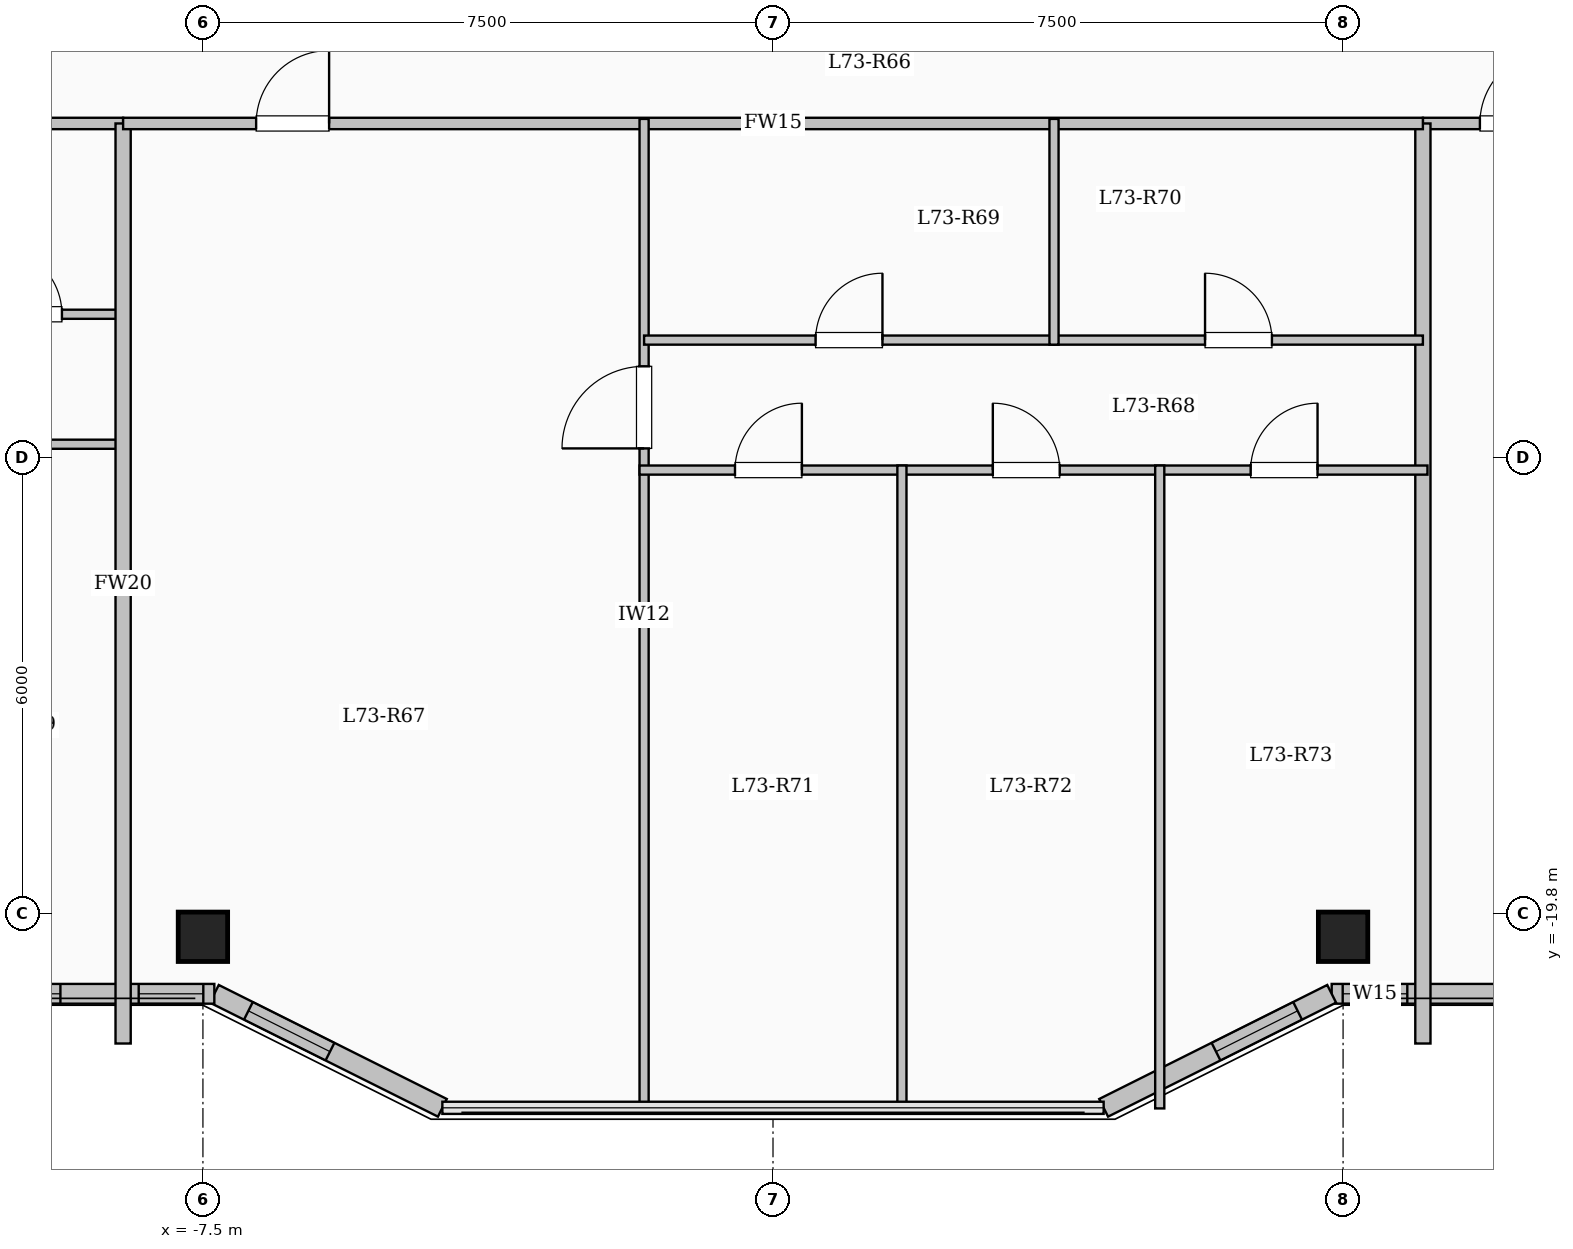
"""IFC4 building model, lengths in metres.
Left out: names, types, materials, properties, quantities, classifications, styles, units other than length and angle.
Written with IfcOpenShell. Run it as: python <this file> out.ifc"""

import sys

from ifc_helpers import new_model, si_unit, direction, frame, frame_2d, origin, origin_2d, place, context, subcontext, project, spatial, rectangle, extrude, element, fill, save


model = new_model("IFC4")
c1 = context("Model", 3, precision=1e-05, world=origin(), true_north=direction((0.0, 1.0)))
c2 = subcontext(c1, "Body", "Model", "MODEL_VIEW")
j1 = project(units=[si_unit("LENGTHUNIT", "METRE"), si_unit("PLANEANGLEUNIT", "RADIAN")], contexts=[c1])
p1 = place(None, origin())
s1 = spatial("IfcSite", under=j1, at=p1, CompositionType="ELEMENT")
p2 = place(p1, origin())
s2 = spatial("IfcBuilding", under=s1, at=p2, CompositionType="ELEMENT")
p3 = place(p2, frame((0.0, 0.0, 268.3)))
s3 = spatial("IfcBuildingStorey", under=s2, at=p3, CompositionType="ELEMENT", Elevation=268.3)
for number, where, z_axis, x_axis in (
    (1, (-7.5, -20.1, 0.0), (0.0, 0.0, 1.0), (1.0, 0.0, 0.0)),
    (2, (7.5, -20.1, 0.0), (0.0, 0.0, 1.0), (1.0, 0.0, 0.0)),
):
    element("IfcColumn", number, at=place(p3, frame(where, z_axis=z_axis, x_axis=x_axis)), inside=s3, PredefinedType="COLUMN", context=c2, shape_type="SweptSolid", body=[
        extrude(rectangle(XDim=0.65, YDim=0.65, at=origin_2d()), origin(), (0.0, 0.0, 1.0), 3.35),
    ])
p4 = place(p3, frame((17.85, -20.85, 0.0), z_axis=(0.0, 0.0, 1.0), x_axis=(-1.0, 0.0, 0.0)))
e3 = element("IfcWall", 3, at=p4, inside=s3, PredefinedType="SOLIDWALL", context=c2, shape_type="SweptSolid", body=[
    extrude(rectangle(XDim=10.5, YDim=0.26, at=frame_2d((5.25, 0.0))), origin(), (0.0, 0.0, 1.0), 3.05),
])
p5 = place(p4, frame((0.875, 0.0, 0.95)))
e4 = element("IfcOpeningElement", 4, at=p5, cuts=e3, PredefinedType="OPENING", context=c2, shape_type="SweptSolid", body=[
    extrude(rectangle(XDim=1.2, YDim=1.5, at=frame_2d((0.6, 0.75))), frame((0.0, 0.14, 0.0), z_axis=(0.0, -1.0, 0.0), x_axis=(1.0, 0.0, 0.0)), (0.0, 0.0, 1.0), 0.28),
])
p6 = place(p4, frame((3.625, 0.0, 0.95)))
e5 = element("IfcOpeningElement", 5, at=p6, cuts=e3, PredefinedType="OPENING", context=c2, shape_type="SweptSolid", body=[
    extrude(rectangle(XDim=1.2, YDim=1.5, at=frame_2d((0.6, 0.75))), frame((0.0, 0.14, 0.0), z_axis=(0.0, -1.0, 0.0), x_axis=(1.0, 0.0, 0.0)), (0.0, 0.0, 1.0), 0.28),
])
p7 = place(p4, frame((6.6, 0.0, 0.9)))
e6 = element("IfcOpeningElement", 6, at=p7, cuts=e3, PredefinedType="OPENING", context=c2, shape_type="SweptSolid", body=[
    extrude(rectangle(XDim=1.65, YDim=1.6, at=frame_2d((0.825, 0.8))), frame((0.0, 0.14, 0.0), z_axis=(0.0, -1.0, 0.0), x_axis=(1.0, 0.0, 0.0)), (0.0, 0.0, 1.0), 0.28),
])
p8 = place(p4, frame((9.505, 0.0, 0.95)))
e7 = element("IfcOpeningElement", 7, at=p8, cuts=e3, PredefinedType="OPENING", context=c2, shape_type="SweptSolid", body=[
    extrude(rectangle(XDim=0.85, YDim=1.5, at=frame_2d((0.425, 0.75))), frame((0.0, 0.14, 0.0), z_axis=(0.0, -1.0, 0.0), x_axis=(1.0, 0.0, 0.0)), (0.0, 0.0, 1.0), 0.28),
])
p9 = place(p3, frame((7.35, -20.85, 0.0), z_axis=(0.0, 0.0, 1.0), x_axis=(-0.894427191, -0.4472135955, 0.0)))
e8 = element("IfcWall", 8, at=p9, inside=s3, PredefinedType="SOLIDWALL", context=c2, shape_type="SweptSolid", body=[
    extrude(rectangle(XDim=3.354, YDim=0.26, at=frame_2d((1.677, 0.0))), origin(), (0.0, 0.0, 1.0), 3.05),
])
p10 = place(p9, frame((0.501, 0.0, 0.95)))
e9 = element("IfcOpeningElement", 9, at=p10, cuts=e8, PredefinedType="OPENING", context=c2, shape_type="SweptSolid", body=[
    extrude(rectangle(XDim=1.2, YDim=1.5, at=frame_2d((0.6, 0.75))), frame((0.0, 0.14, 0.0), z_axis=(0.0, -1.0, 0.0), x_axis=(1.0, 0.0, 0.0)), (0.0, 0.0, 1.0), 0.28),
])
p11 = place(p3, frame((-4.35, -22.35, 0.0), z_axis=(0.0, 0.0, 1.0), x_axis=(-0.894427191, 0.4472135955, 0.0)))
e10 = element("IfcWall", 10, at=p11, inside=s3, PredefinedType="SOLIDWALL", context=c2, shape_type="SweptSolid", body=[
    extrude(rectangle(XDim=3.354, YDim=0.26, at=frame_2d((1.677, 0.0))), origin(), (0.0, 0.0, 1.0), 3.05),
])
p12 = place(p11, frame((1.653, 0.0, 0.95)))
e11 = element("IfcOpeningElement", 11, at=p12, cuts=e10, PredefinedType="OPENING", context=c2, shape_type="SweptSolid", body=[
    extrude(rectangle(XDim=1.2, YDim=1.5, at=frame_2d((0.6, 0.75))), frame((0.0, 0.14, 0.0), z_axis=(0.0, -1.0, 0.0), x_axis=(1.0, 0.0, 0.0)), (0.0, 0.0, 1.0), 0.28),
])
p13 = place(p3, frame((-7.35, -20.85, 0.0), z_axis=(0.0, 0.0, 1.0), x_axis=(-1.0, 0.0, 0.0)))
e12 = element("IfcWall", 12, at=p13, inside=s3, PredefinedType="SOLIDWALL", context=c2, shape_type="SweptSolid", body=[
    extrude(rectangle(XDim=10.5, YDim=0.26, at=frame_2d((5.25, 0.0))), origin(), (0.0, 0.0, 1.0), 3.05),
])
p14 = place(p13, frame((0.145, 0.0, 0.95)))
e13 = element("IfcOpeningElement", 13, at=p14, cuts=e12, PredefinedType="OPENING", context=c2, shape_type="SweptSolid", body=[
    extrude(rectangle(XDim=0.85, YDim=1.5, at=frame_2d((0.425, 0.75))), frame((0.0, 0.14, 0.0), z_axis=(0.0, -1.0, 0.0), x_axis=(1.0, 0.0, 0.0)), (0.0, 0.0, 1.0), 0.28),
])
p15 = place(p13, frame((2.025, 0.0, 0.95)))
e14 = element("IfcOpeningElement", 14, at=p15, cuts=e12, PredefinedType="OPENING", context=c2, shape_type="SweptSolid", body=[
    extrude(rectangle(XDim=1.2, YDim=1.5, at=frame_2d((0.6, 0.75))), frame((0.0, 0.14, 0.0), z_axis=(0.0, -1.0, 0.0), x_axis=(1.0, 0.0, 0.0)), (0.0, 0.0, 1.0), 0.28),
])
p16 = place(p13, frame((4.775, 0.0, 0.95)))
e15 = element("IfcOpeningElement", 15, at=p16, cuts=e12, PredefinedType="OPENING", context=c2, shape_type="SweptSolid", body=[
    extrude(rectangle(XDim=1.2, YDim=1.5, at=frame_2d((0.6, 0.75))), frame((0.0, 0.14, 0.0), z_axis=(0.0, -1.0, 0.0), x_axis=(1.0, 0.0, 0.0)), (0.0, 0.0, 1.0), 0.28),
])
p17 = place(p13, frame((7.75, 0.0, 0.9)))
e16 = element("IfcOpeningElement", 16, at=p17, cuts=e12, PredefinedType="OPENING", context=c2, shape_type="SweptSolid", body=[
    extrude(rectangle(XDim=1.65, YDim=1.6, at=frame_2d((0.825, 0.8))), frame((0.0, 0.14, 0.0), z_axis=(0.0, -1.0, 0.0), x_axis=(1.0, 0.0, 0.0)), (0.0, 0.0, 1.0), 0.28),
])
p18 = place(p3, frame((-17.75, -9.4, 0.0), z_axis=(0.0, 0.0, 1.0), x_axis=(1.0, 0.0, 0.0)))
e17 = element("IfcWall", 17, at=p18, inside=s3, PredefinedType="PARTITIONING", context=c2, shape_type="SweptSolid", body=[
    extrude(rectangle(XDim=9.2, YDim=0.15, at=frame_2d((4.6, 0.0))), origin(), (0.0, 0.0, 1.0), 3.05),
])
p19 = place(p18, frame((0.7, 0.0, 0.0)))
e18 = element("IfcOpeningElement", 18, at=p19, cuts=e17, PredefinedType="OPENING", context=c2, shape_type="SweptSolid", body=[
    extrude(rectangle(XDim=0.96, YDim=2.15, at=frame_2d((0.48, 1.075))), frame((0.0, 0.085, 0.0), z_axis=(0.0, -1.0, 0.0), x_axis=(1.0, 0.0, 0.0)), (0.0, 0.0, 1.0), 0.17),
])
p20 = place(p3, frame((8.55, -9.4, 0.0), z_axis=(0.0, 0.0, 1.0), x_axis=(1.0, 0.0, 0.0)))
e19 = element("IfcWall", 19, at=p20, inside=s3, PredefinedType="PARTITIONING", context=c2, shape_type="SweptSolid", body=[
    extrude(rectangle(XDim=9.2, YDim=0.15, at=frame_2d((4.6, 0.0))), origin(), (0.0, 0.0, 1.0), 3.05),
])
p21 = place(p20, frame((0.75, 0.0, 0.0)))
e20 = element("IfcOpeningElement", 20, at=p21, cuts=e19, PredefinedType="OPENING", context=c2, shape_type="SweptSolid", body=[
    extrude(rectangle(XDim=0.96, YDim=2.15, at=frame_2d((0.48, 1.075))), frame((0.0, 0.085, 0.0), z_axis=(0.0, -1.0, 0.0), x_axis=(1.0, 0.0, 0.0)), (0.0, 0.0, 1.0), 0.17),
])
p22 = place(p3, frame((-10.99, -11.91, 0.0), z_axis=(0.0, 0.0, 1.0), x_axis=(1.0, 0.0, 0.0)))
e21 = element("IfcWall", 21, at=p22, inside=s3, PredefinedType="PARTITIONING", context=c2, shape_type="SweptSolid", body=[
    extrude(rectangle(XDim=2.39, YDim=0.12, at=frame_2d((1.195, 0.0))), origin(), (0.0, 0.0, 1.0), 3.05),
])
p23 = place(p22, frame((0.755, 0.0, 0.0)))
e22 = element("IfcOpeningElement", 22, at=p23, cuts=e21, PredefinedType="OPENING", context=c2, shape_type="SweptSolid", body=[
    extrude(rectangle(XDim=0.88, YDim=2.1, at=frame_2d((0.44, 1.05))), frame((0.0, 0.07, 0.0), z_axis=(0.0, -1.0, 0.0), x_axis=(1.0, 0.0, 0.0)), (0.0, 0.0, 1.0), 0.14),
])
p24 = place(p3, frame((-14.138, -13.62, 0.0), z_axis=(0.0, 0.0, 1.0), x_axis=(1.0, 0.0, 0.0)))
e23 = element("IfcWall", 23, at=p24, inside=s3, PredefinedType="PARTITIONING", context=c2, shape_type="SweptSolid", body=[
    extrude(rectangle(XDim=5.598, YDim=0.12, at=frame_2d((2.799, 0.0))), origin(), (0.0, 0.0, 1.0), 3.05),
])
p25 = place(p24, frame((0.914, 0.0, 0.0)))
e24 = element("IfcOpeningElement", 24, at=p25, cuts=e23, PredefinedType="OPENING", context=c2, shape_type="SweptSolid", body=[
    extrude(rectangle(XDim=0.88, YDim=2.1, at=frame_2d((0.44, 1.05))), frame((0.0, 0.07, 0.0), z_axis=(0.0, -1.0, 0.0), x_axis=(1.0, 0.0, 0.0)), (0.0, 0.0, 1.0), 0.14),
])
p26 = place(p24, frame((3.623, 0.0, 0.0)))
e25 = element("IfcOpeningElement", 25, at=p26, cuts=e23, PredefinedType="OPENING", context=c2, shape_type="SweptSolid", body=[
    extrude(rectangle(XDim=0.88, YDim=2.1, at=frame_2d((0.44, 1.05))), frame((0.0, 0.07, 0.0), z_axis=(0.0, -1.0, 0.0), x_axis=(1.0, 0.0, 0.0)), (0.0, 0.0, 1.0), 0.14),
])
for number, where, z_axis, x_axis in (
    (26, (-8.55, -21.504, 0.0), (0.0, 0.0, 1.0), (0.0, 1.0, 0.0)),
    (27, (8.55, -21.504, 0.0), (0.0, 0.0, 1.0), (0.0, 1.0, 0.0)),
):
    element("IfcWall", number, at=place(p3, frame(where, z_axis=z_axis, x_axis=x_axis)), inside=s3, PredefinedType="SOLIDWALL", context=c2, shape_type="SweptSolid", body=[
        extrude(rectangle(XDim=12.104, YDim=0.2, at=frame_2d((6.052, 0.0))), origin(), (0.0, 0.0, 1.0), 3.05),
    ])
p27 = place(p3, frame((-8.55, -9.4, 0.0), z_axis=(0.0, 0.0, 1.0), x_axis=(1.0, 0.0, 0.0)))
e28 = element("IfcWall", 28, at=p27, inside=s3, PredefinedType="PARTITIONING", context=c2, shape_type="SweptSolid", body=[
    extrude(rectangle(XDim=17.1, YDim=0.15, at=frame_2d((8.55, 0.0))), origin(), (0.0, 0.0, 1.0), 3.05),
])
p28 = place(p27, frame((1.75, 0.0, 0.0)))
e29 = element("IfcOpeningElement", 29, at=p28, cuts=e28, PredefinedType="OPENING", context=c2, shape_type="SweptSolid", body=[
    extrude(rectangle(XDim=0.96, YDim=2.15, at=frame_2d((0.48, 1.075))), frame((0.0, 0.085, 0.0), z_axis=(0.0, -1.0, 0.0), x_axis=(1.0, 0.0, 0.0)), (0.0, 0.0, 1.0), 0.17),
])
p29 = place(p3, frame((-1.696, -22.38, 0.0), z_axis=(0.0, 0.0, 1.0), x_axis=(0.0, 1.0, 0.0)))
e30 = element("IfcWall", 30, at=p29, inside=s3, PredefinedType="PARTITIONING", context=c2, shape_type="SweptSolid", body=[
    extrude(rectangle(XDim=13.04, YDim=0.12, at=frame_2d((6.52, 0.0))), origin(), (0.0, 0.0, 1.0), 3.05),
])
p30 = place(p29, frame((8.705, 0.0, 0.0)))
e31 = element("IfcOpeningElement", 31, at=p30, cuts=e30, PredefinedType="OPENING", context=c2, shape_type="SweptSolid", body=[
    extrude(rectangle(XDim=1.08, YDim=2.15, at=frame_2d((0.54, 1.075))), frame((0.0, 0.07, 0.0), z_axis=(0.0, -1.0, 0.0), x_axis=(1.0, 0.0, 0.0)), (0.0, 0.0, 1.0), 0.14),
])
p31 = place(p3, frame((-1.696, -12.25, 0.0), z_axis=(0.0, 0.0, 1.0), x_axis=(1.0, 0.0, 0.0)))
e32 = element("IfcWall", 32, at=p31, inside=s3, PredefinedType="PARTITIONING", context=c2, shape_type="SweptSolid", body=[
    extrude(rectangle(XDim=5.393, YDim=0.12, at=frame_2d((2.697, 0.0))), origin(), (0.0, 0.0, 1.0), 2.735),
])
p32 = place(p31, frame((2.256, 0.0, 0.0)))
e33 = element("IfcOpeningElement", 33, at=p32, cuts=e32, PredefinedType="OPENING", context=c2, shape_type="SweptSolid", body=[
    extrude(rectangle(XDim=0.88, YDim=2.1, at=frame_2d((0.44, 1.05))), frame((0.0, 0.07, 0.0), z_axis=(0.0, -1.0, 0.0), x_axis=(1.0, 0.0, 0.0)), (0.0, 0.0, 1.0), 0.14),
])
p33 = place(p3, frame((3.697, -12.25, 0.0), z_axis=(0.0, 0.0, 1.0), x_axis=(1.0, 0.0, 0.0)))
e34 = element("IfcWall", 34, at=p33, inside=s3, PredefinedType="PARTITIONING", context=c2, shape_type="SweptSolid", body=[
    extrude(rectangle(XDim=4.853, YDim=0.12, at=frame_2d((2.427, 0.0))), origin(), (0.0, 0.0, 1.0), 2.735),
])
p34 = place(p33, frame((1.987, 0.0, 0.0)))
e35 = element("IfcOpeningElement", 35, at=p34, cuts=e34, PredefinedType="OPENING", context=c2, shape_type="SweptSolid", body=[
    extrude(rectangle(XDim=0.88, YDim=2.1, at=frame_2d((0.44, 1.05))), frame((0.0, 0.07, 0.0), z_axis=(0.0, -1.0, 0.0), x_axis=(1.0, 0.0, 0.0)), (0.0, 0.0, 1.0), 0.14),
])
p35 = place(p3, frame((-1.756, -13.96, 0.0), z_axis=(0.0, 0.0, 1.0), x_axis=(1.0, 0.0, 0.0)))
e36 = element("IfcWall", 36, at=p35, inside=s3, PredefinedType="PARTITIONING", context=c2, shape_type="SweptSolid", body=[
    extrude(rectangle(XDim=10.366, YDim=0.12, at=frame_2d((5.183, 0.0))), origin(), (0.0, 0.0, 1.0), 2.735),
])
p36 = place(p35, frame((1.256, 0.0, 0.0)))
e37 = element("IfcOpeningElement", 37, at=p36, cuts=e36, PredefinedType="OPENING", context=c2, shape_type="SweptSolid", body=[
    extrude(rectangle(XDim=0.88, YDim=2.1, at=frame_2d((0.44, 1.05))), frame((0.0, 0.07, 0.0), z_axis=(0.0, -1.0, 0.0), x_axis=(1.0, 0.0, 0.0)), (0.0, 0.0, 1.0), 0.14),
])
p37 = place(p35, frame((4.648, 0.0, 0.0)))
e38 = element("IfcOpeningElement", 38, at=p37, cuts=e36, PredefinedType="OPENING", context=c2, shape_type="SweptSolid", body=[
    extrude(rectangle(XDim=0.88, YDim=2.1, at=frame_2d((0.44, 1.05))), frame((0.0, 0.07, 0.0), z_axis=(0.0, -1.0, 0.0), x_axis=(1.0, 0.0, 0.0)), (0.0, 0.0, 1.0), 0.14),
])
p38 = place(p35, frame((8.04, 0.0, 0.0)))
e39 = element("IfcOpeningElement", 39, at=p38, cuts=e36, PredefinedType="OPENING", context=c2, shape_type="SweptSolid", body=[
    extrude(rectangle(XDim=0.88, YDim=2.1, at=frame_2d((0.44, 1.05))), frame((0.0, 0.07, 0.0), z_axis=(0.0, -1.0, 0.0), x_axis=(1.0, 0.0, 0.0)), (0.0, 0.0, 1.0), 0.14),
])
p39 = place(p3, frame((3.697, -12.31, 0.0), z_axis=(0.0, 0.0, 1.0), x_axis=(0.0, 1.0, 0.0)))
e40 = element("IfcWall", 40, at=p39, inside=s3, PredefinedType="PARTITIONING", context=c2, shape_type="SweptSolid", body=[
    extrude(rectangle(XDim=2.97, YDim=0.12, at=frame_2d((1.485, 0.0))), origin(), (0.0, 0.0, 1.0), 3.05),
])
p40 = place(p3, frame((1.696, -22.38, 0.0), z_axis=(0.0, 0.0, 1.0), x_axis=(0.0, 1.0, 0.0)))
e41 = element("IfcWall", 41, at=p40, inside=s3, PredefinedType="PARTITIONING", context=c2, shape_type="SweptSolid", body=[
    extrude(rectangle(XDim=8.48, YDim=0.12, at=frame_2d((4.24, 0.0))), origin(), (0.0, 0.0, 1.0), 3.05),
])
p41 = place(p3, frame((5.088, -22.358, 0.0), z_axis=(0.0, 0.0, 1.0), x_axis=(0.0, 1.0, 0.0)))
e42 = element("IfcWall", 42, at=p41, inside=s3, PredefinedType="PARTITIONING", context=c2, shape_type="SweptSolid", body=[
    extrude(rectangle(XDim=8.458, YDim=0.12, at=frame_2d((4.229, 0.0))), origin(), (0.0, 0.0, 1.0), 3.05),
])
p42 = place(p8, origin())
e43 = element("IfcWindow", 43, at=p42, inside=s3, PartitioningType="SINGLE_PANEL", PredefinedType="WINDOW", context=c2, shape_type="SweptSolid", body=[
    extrude(rectangle(XDim=0.85, YDim=1.5, at=frame_2d((0.425, 0.75))), frame((0.0, 0.03, 0.0), z_axis=(0.0, -1.0, 0.0), x_axis=(1.0, 0.0, 0.0)), (0.0, 0.0, 1.0), 0.06),
])
fill(e7, e43)
p43 = place(p10, origin())
e44 = element("IfcWindow", 44, at=p43, inside=s3, PartitioningType="SINGLE_PANEL", PredefinedType="WINDOW", context=c2, shape_type="SweptSolid", body=[
    extrude(rectangle(XDim=1.2, YDim=1.5, at=frame_2d((0.6, 0.75))), frame((0.0, 0.03, 0.0), z_axis=(0.0, -1.0, 0.0), x_axis=(1.0, 0.0, 0.0)), (0.0, 0.0, 1.0), 0.06),
])
fill(e9, e44)
p44 = place(p12, origin())
e45 = element("IfcWindow", 45, at=p44, inside=s3, PartitioningType="SINGLE_PANEL", PredefinedType="WINDOW", context=c2, shape_type="SweptSolid", body=[
    extrude(rectangle(XDim=1.2, YDim=1.5, at=frame_2d((0.6, 0.75))), frame((0.0, 0.03, 0.0), z_axis=(0.0, -1.0, 0.0), x_axis=(1.0, 0.0, 0.0)), (0.0, 0.0, 1.0), 0.06),
])
fill(e11, e45)
p45 = place(p14, origin())
e46 = element("IfcWindow", 46, at=p45, inside=s3, PartitioningType="SINGLE_PANEL", PredefinedType="WINDOW", context=c2, shape_type="SweptSolid", body=[
    extrude(rectangle(XDim=0.85, YDim=1.5, at=frame_2d((0.425, 0.75))), frame((0.0, 0.03, 0.0), z_axis=(0.0, -1.0, 0.0), x_axis=(1.0, 0.0, 0.0)), (0.0, 0.0, 1.0), 0.06),
])
fill(e13, e46)
p46 = place(p15, origin())
e47 = element("IfcWindow", 47, at=p46, inside=s3, PartitioningType="SINGLE_PANEL", PredefinedType="WINDOW", context=c2, shape_type="SweptSolid", body=[
    extrude(rectangle(XDim=1.2, YDim=1.5, at=frame_2d((0.6, 0.75))), frame((0.0, 0.03, 0.0), z_axis=(0.0, -1.0, 0.0), x_axis=(1.0, 0.0, 0.0)), (0.0, 0.0, 1.0), 0.06),
])
fill(e14, e47)
p47 = place(p23, origin())
e48 = element("IfcDoor", 48, at=p47, inside=s3, OperationType="SINGLE_SWING_LEFT", PredefinedType="DOOR", context=c2, shape_type="SweptSolid", body=[
    extrude(rectangle(XDim=0.88, YDim=2.1, at=frame_2d((0.44, 1.05))), frame((0.0, 0.025, 0.0), z_axis=(0.0, -1.0, 0.0), x_axis=(1.0, 0.0, 0.0)), (0.0, 0.0, 1.0), 0.05),
])
fill(e22, e48)
p48 = place(p21, origin())
e49 = element("IfcDoor", 49, at=p48, inside=s3, OperationType="SINGLE_SWING_RIGHT", PredefinedType="DOOR", context=c2, shape_type="SweptSolid", body=[
    extrude(rectangle(XDim=0.96, YDim=2.15, at=frame_2d((0.48, 1.075))), frame((0.0, 0.025, 0.0), z_axis=(0.0, -1.0, 0.0), x_axis=(1.0, 0.0, 0.0)), (0.0, 0.0, 1.0), 0.05),
])
fill(e20, e49)
p49 = place(p28, origin())
e50 = element("IfcDoor", 50, at=p49, inside=s3, OperationType="SINGLE_SWING_RIGHT", PredefinedType="DOOR", context=c2, shape_type="SweptSolid", body=[
    extrude(rectangle(XDim=0.96, YDim=2.15, at=frame_2d((0.48, 1.075))), frame((0.0, 0.025, 0.0), z_axis=(0.0, -1.0, 0.0), x_axis=(1.0, 0.0, 0.0)), (0.0, 0.0, 1.0), 0.05),
])
fill(e29, e50)
p50 = place(p30, origin())
e51 = element("IfcDoor", 51, at=p50, inside=s3, OperationType="SINGLE_SWING_LEFT", PredefinedType="DOOR", context=c2, shape_type="SweptSolid", body=[
    extrude(rectangle(XDim=1.08, YDim=2.15, at=frame_2d((0.54, 1.075))), frame((0.0, 0.025, 0.0), z_axis=(0.0, -1.0, 0.0), x_axis=(1.0, 0.0, 0.0)), (0.0, 0.0, 1.0), 0.05),
])
fill(e31, e51)
p51 = place(p32, origin())
e52 = element("IfcDoor", 52, at=p51, inside=s3, OperationType="SINGLE_SWING_RIGHT", PredefinedType="DOOR", context=c2, shape_type="SweptSolid", body=[
    extrude(rectangle(XDim=0.88, YDim=2.1, at=frame_2d((0.44, 1.05))), frame((0.0, 0.025, 0.0), z_axis=(0.0, -1.0, 0.0), x_axis=(1.0, 0.0, 0.0)), (0.0, 0.0, 1.0), 0.05),
])
fill(e33, e52)
p52 = place(p34, origin())
e53 = element("IfcDoor", 53, at=p52, inside=s3, OperationType="SINGLE_SWING_LEFT", PredefinedType="DOOR", context=c2, shape_type="SweptSolid", body=[
    extrude(rectangle(XDim=0.88, YDim=2.1, at=frame_2d((0.44, 1.05))), frame((0.0, 0.025, 0.0), z_axis=(0.0, -1.0, 0.0), x_axis=(1.0, 0.0, 0.0)), (0.0, 0.0, 1.0), 0.05),
])
fill(e35, e53)
p53 = place(p36, origin())
e54 = element("IfcDoor", 54, at=p53, inside=s3, OperationType="SINGLE_SWING_RIGHT", PredefinedType="DOOR", context=c2, shape_type="SweptSolid", body=[
    extrude(rectangle(XDim=0.88, YDim=2.1, at=frame_2d((0.44, 1.05))), frame((0.0, 0.025, 0.0), z_axis=(0.0, -1.0, 0.0), x_axis=(1.0, 0.0, 0.0)), (0.0, 0.0, 1.0), 0.05),
])
fill(e37, e54)
p54 = place(p37, origin())
e55 = element("IfcDoor", 55, at=p54, inside=s3, OperationType="SINGLE_SWING_LEFT", PredefinedType="DOOR", context=c2, shape_type="SweptSolid", body=[
    extrude(rectangle(XDim=0.88, YDim=2.1, at=frame_2d((0.44, 1.05))), frame((0.0, 0.025, 0.0), z_axis=(0.0, -1.0, 0.0), x_axis=(1.0, 0.0, 0.0)), (0.0, 0.0, 1.0), 0.05),
])
fill(e38, e55)
p55 = place(p38, origin())
e56 = element("IfcDoor", 56, at=p55, inside=s3, OperationType="SINGLE_SWING_RIGHT", PredefinedType="DOOR", context=c2, shape_type="SweptSolid", body=[
    extrude(rectangle(XDim=0.88, YDim=2.1, at=frame_2d((0.44, 1.05))), frame((0.0, 0.025, 0.0), z_axis=(0.0, -1.0, 0.0), x_axis=(1.0, 0.0, 0.0)), (0.0, 0.0, 1.0), 0.05),
])
fill(e39, e56)
save(model, sys.argv[1])
